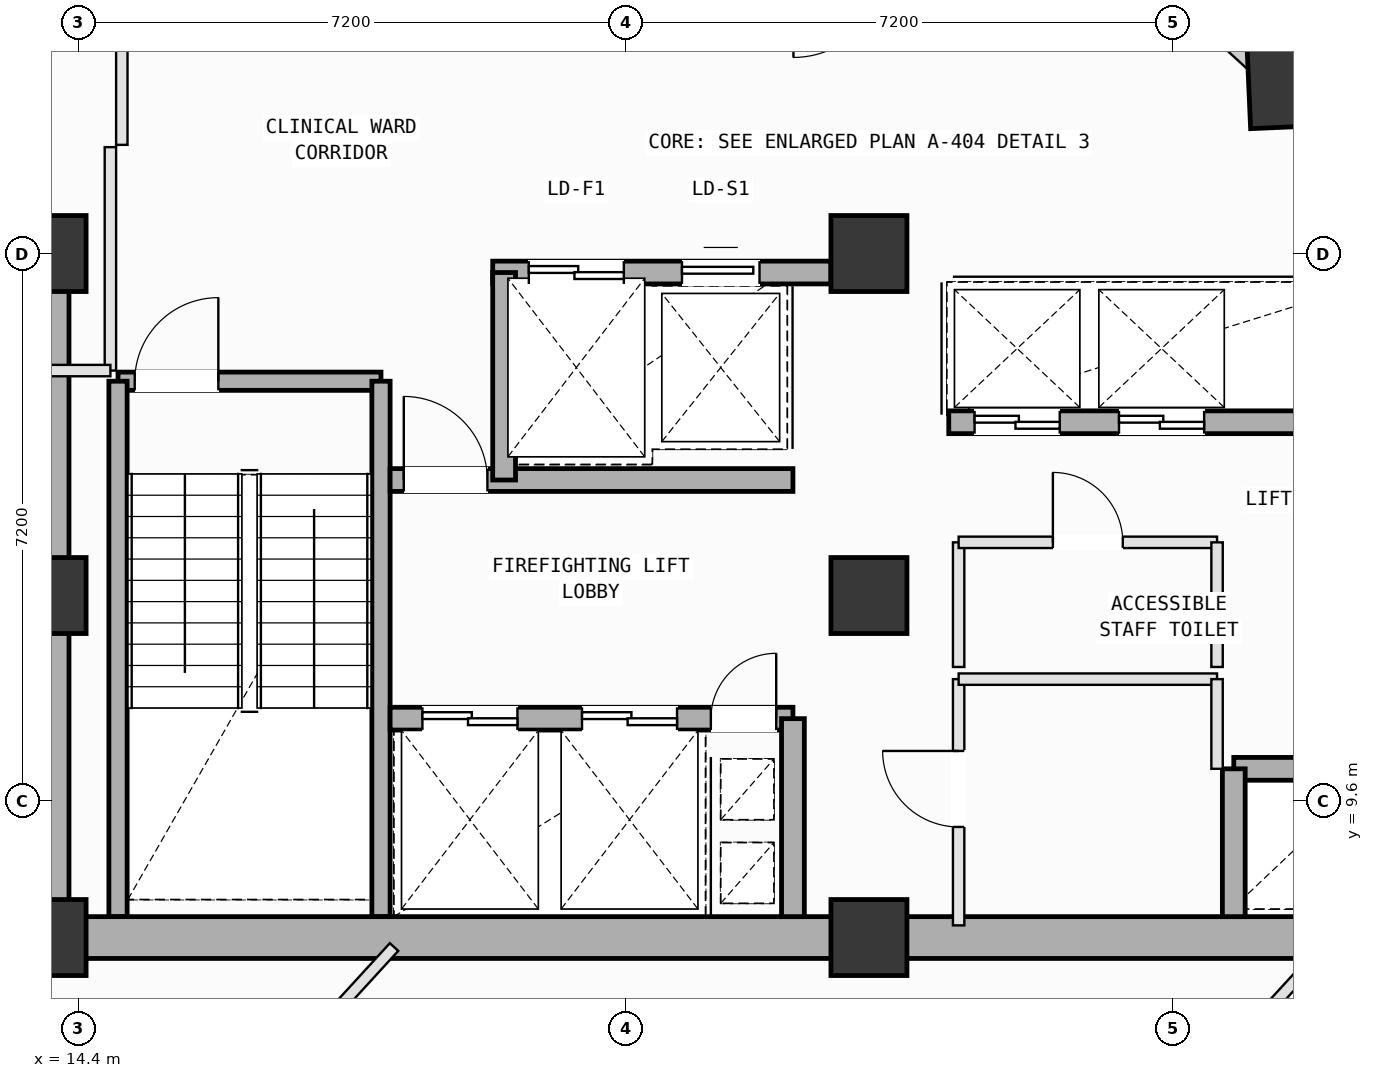
"""IFC4 building model, lengths in metres.
Left out: names, types, materials, properties, quantities, classifications, styles, units other than length and angle.
Written with IfcOpenShell. Run it as: python <this file> out.ifc"""

import sys

from ifc_helpers import new_model, si_unit, direction, frame, frame_2d, origin, origin_2d, place, context, subcontext, project, spatial, rectangle, extrude, element, fill, save


model = new_model("IFC4")
c1 = context("Model", 3, precision=1e-05, world=origin(), true_north=direction((0.0, 1.0)))
c2 = subcontext(c1, "Body", "Model", "MODEL_VIEW")
j1 = project(units=[si_unit("LENGTHUNIT", "METRE"), si_unit("PLANEANGLEUNIT", "RADIAN")], contexts=[c1])
p1 = place(None, origin())
s1 = spatial("IfcSite", under=j1, at=p1, CompositionType="ELEMENT")
p2 = place(p1, origin())
s2 = spatial("IfcBuilding", under=s1, at=p2, CompositionType="ELEMENT")
p3 = place(p2, frame((0.0, 0.0, 227.2)))
s3 = spatial("IfcBuildingStorey", under=s2, at=p3, CompositionType="ELEMENT", Elevation=227.2)
for number, where, z_axis, x_axis in (
    (1, (14.0, 7.8, 0.0), (0.0, 0.0, 1.0), (1.0, 0.0, 0.0)),
    (2, (14.0, 12.3, 0.0), (0.0, 0.0, 1.0), (1.0, 0.0, 0.0)),
    (3, (14.0, 16.8, 0.0), (0.0, 0.0, 1.0), (1.0, 0.0, 0.0)),
    (4, (24.8, 7.8, 0.0), (0.0, 0.0, 1.0), (1.0, 0.0, 0.0)),
    (5, (24.8, 12.3, 0.0), (0.0, 0.0, 1.0), (1.0, 0.0, 0.0)),
    (6, (24.8, 16.8, 0.0), (0.0, 0.0, 1.0), (1.0, 0.0, 0.0)),
):
    element("IfcColumn", number, at=place(p3, frame(where, z_axis=z_axis, x_axis=x_axis)), inside=s3, PredefinedType="COLUMN", context=c2, shape_type="SweptSolid", body=[
        extrude(rectangle(XDim=1.0, YDim=1.0, at=origin_2d()), origin(), (0.0, 0.0, 1.0), 4.0),
    ])
p4 = place(p3, frame((30.17, 19.059, 0.002), z_axis=(0.023938480459, -0.014045537004, 0.999614761818), x_axis=(-0.883420388309, 0.467760147115, 0.027728366183)))
e7 = element("IfcColumn", 7, at=p4, inside=s3, PredefinedType="COLUMN", context=c2, shape_type="SweptSolid", body=[
    extrude(rectangle(XDim=1.2, YDim=0.75, at=origin_2d()), origin(), (0.0, 0.0, 1.0), 3.998),
])
p5 = place(p3, frame((30.444, 19.358, 0.0), z_axis=(0.0, 0.0, 1.0), x_axis=(0.675589973943, 0.737277550931, 0.0)))
e8 = element("IfcWall", 8, at=p5, inside=s3, PredefinedType="SOLIDWALL", context=c2, shape_type="SweptSolid", body=[
    extrude(rectangle(XDim=6.158, YDim=0.28, at=frame_2d((3.079, 0.0))), origin(), (0.0, 0.0, 1.0), 3.265),
])
p6 = place(p5, frame((0.658, 0.0, 0.75)))
e9 = element("IfcOpeningElement", 9, at=p6, cuts=e8, PredefinedType="OPENING", context=c2, shape_type="SweptSolid", body=[
    extrude(rectangle(XDim=1.6, YDim=1.95, at=frame_2d((0.8, 0.975))), frame((0.0, 0.15, 0.0), z_axis=(0.0, -1.0, 0.0), x_axis=(1.0, 0.0, 0.0)), (0.0, 0.0, 1.0), 0.3),
])
p7 = place(p3, frame((24.787, 23.991, 0.0), z_axis=(0.0, 0.0, 1.0), x_axis=(0.737275011719, -0.675592744998, 0.0)))
e10 = element("IfcWall", 10, at=p7, inside=s3, PredefinedType="SOLIDWALL", context=c2, shape_type="SweptSolid", body=[
    extrude(rectangle(XDim=6.958, YDim=0.28, at=frame_2d((3.479, 0.0))), origin(), (0.0, 0.0, 1.0), 3.165),
])
p8 = place(p3, frame((14.92, 15.12, 0.0), z_axis=(0.0, 0.0, 1.0), x_axis=(1.0, 0.0, 0.0)))
e11 = element("IfcWall", 11, at=p8, inside=s3, PredefinedType="SOLIDWALL", context=c2, shape_type="SweptSolid", body=[
    extrude(rectangle(XDim=3.46, YDim=0.24, at=frame_2d((1.73, 0.0))), origin(), (0.0, 0.0, 1.0), 3.78),
])
p9 = place(p8, frame((0.22, 0.0, 0.0)))
e12 = element("IfcOpeningElement", 12, at=p9, cuts=e11, PredefinedType="OPENING", context=c2, shape_type="SweptSolid", body=[
    extrude(rectangle(XDim=1.1, YDim=2.15, at=frame_2d((0.55, 1.075))), frame((0.0, 0.13, 0.0), z_axis=(0.0, -1.0, 0.0), x_axis=(1.0, 0.0, 0.0)), (0.0, 0.0, 1.0), 0.26),
])
for number, where, z_axis, x_axis in (
    (13, (18.38, 15.12, 0.0), (0.0, 0.0, 1.0), (0.0, -1.0, 0.0)),
    (14, (14.92, 8.075, 0.0), (0.0, 0.0, 1.0), (0.0, 1.0, 0.0)),
):
    element("IfcWall", number, at=place(p3, frame(where, z_axis=z_axis, x_axis=x_axis)), inside=s3, PredefinedType="SOLIDWALL", context=c2, shape_type="SweptSolid", body=[
        extrude(rectangle(XDim=7.045, YDim=0.24, at=frame_2d((3.522, 0.0))), origin(), (0.0, 0.0, 1.0), 3.78),
    ])
for number, where, z_axis, x_axis in (
    (15, (14.0, 7.8, 0.0), (0.0, 0.0, 1.0), (1.0, 0.0, 0.0)),
    (16, (24.8, 7.8, 0.0), (0.0, 0.0, 1.0), (1.0, 0.0, 0.0)),
):
    element("IfcWall", number, at=place(p3, frame(where, z_axis=z_axis, x_axis=x_axis)), inside=s3, PredefinedType="SHEAR", context=c2, shape_type="SweptSolid", body=[
        extrude(rectangle(XDim=10.8, YDim=0.55, at=frame_2d((5.4, 0.0))), origin(), (0.0, 0.0, 1.0), 3.78),
    ])
p10 = place(p3, frame((14.0, 16.8, 0.0), z_axis=(0.0, 0.0, 1.0), x_axis=(0.0, -1.0, 0.0)))
e17 = element("IfcWall", 17, at=p10, inside=s3, PredefinedType="SHEAR", context=c2, shape_type="SweptSolid", body=[
    extrude(rectangle(XDim=9.0, YDim=0.55, at=frame_2d((4.5, 0.0))), origin(), (0.0, 0.0, 1.0), 3.78),
])
p11 = place(p3, frame((19.85, 16.55, 0.0), z_axis=(0.0, 0.0, 1.0), x_axis=(1.0, 0.0, 0.0)))
e18 = element("IfcWall", 18, at=p11, inside=s3, PredefinedType="SOLIDWALL", context=c2, shape_type="SweptSolid", body=[
    extrude(rectangle(XDim=4.45, YDim=0.3, at=frame_2d((2.225, 0.0))), origin(), (0.0, 0.0, 1.0), 3.78),
])
p12 = place(p11, frame((0.475, 0.0, 0.0)))
e19 = element("IfcOpeningElement", 19, at=p12, cuts=e18, PredefinedType="OPENING", context=c2, shape_type="SweptSolid", body=[
    extrude(rectangle(XDim=1.25, YDim=2.18, at=frame_2d((0.625, 1.09))), frame((0.0, 0.16, 0.0), z_axis=(0.0, -1.0, 0.0), x_axis=(1.0, 0.0, 0.0)), (0.0, 0.0, 1.0), 0.32),
])
p13 = place(p11, frame((2.49, 0.0, 0.0)))
e20 = element("IfcOpeningElement", 20, at=p13, cuts=e18, PredefinedType="OPENING", context=c2, shape_type="SweptSolid", body=[
    extrude(rectangle(XDim=1.02, YDim=2.12, at=frame_2d((0.51, 1.06))), frame((0.0, 0.16, 0.0), z_axis=(0.0, -1.0, 0.0), x_axis=(1.0, 0.0, 0.0)), (0.0, 0.0, 1.0), 0.32),
])
p14 = place(p3, frame((18.5, 10.68, 0.0), z_axis=(0.0, 0.0, 1.0), x_axis=(1.0, 0.0, 0.0)))
e21 = element("IfcWall", 21, at=p14, inside=s3, PredefinedType="SOLIDWALL", context=c2, shape_type="SweptSolid", body=[
    extrude(rectangle(XDim=5.3, YDim=0.3, at=frame_2d((2.65, 0.0))), origin(), (0.0, 0.0, 1.0), 3.78),
])
p15 = place(p14, frame((4.22, 0.0, 0.0)))
e22 = element("IfcOpeningElement", 22, at=p15, cuts=e21, PredefinedType="OPENING", context=c2, shape_type="SweptSolid", body=[
    extrude(rectangle(XDim=0.86, YDim=2.06, at=frame_2d((0.43, 1.03))), frame((0.0, 0.16, 0.0), z_axis=(0.0, -1.0, 0.0), x_axis=(1.0, 0.0, 0.0)), (0.0, 0.0, 1.0), 0.32),
])
p16 = place(p14, frame((0.425, 0.0, 0.0)))
e23 = element("IfcOpeningElement", 23, at=p16, cuts=e21, PredefinedType="OPENING", context=c2, shape_type="SweptSolid", body=[
    extrude(rectangle(XDim=1.25, YDim=2.18, at=frame_2d((0.625, 1.09))), frame((0.0, 0.16, 0.0), z_axis=(0.0, -1.0, 0.0), x_axis=(1.0, 0.0, 0.0)), (0.0, 0.0, 1.0), 0.32),
])
p17 = place(p14, frame((2.525, 0.0, 0.0)))
e24 = element("IfcOpeningElement", 24, at=p17, cuts=e21, PredefinedType="OPENING", context=c2, shape_type="SweptSolid", body=[
    extrude(rectangle(XDim=1.25, YDim=2.18, at=frame_2d((0.625, 1.09))), frame((0.0, 0.16, 0.0), z_axis=(0.0, -1.0, 0.0), x_axis=(1.0, 0.0, 0.0)), (0.0, 0.0, 1.0), 0.32),
])
p18 = place(p3, frame((18.5, 13.82, 0.0), z_axis=(0.0, 0.0, 1.0), x_axis=(1.0, 0.0, 0.0)))
e25 = element("IfcWall", 25, at=p18, inside=s3, PredefinedType="SOLIDWALL", context=c2, shape_type="SweptSolid", body=[
    extrude(rectangle(XDim=5.3, YDim=0.3, at=frame_2d((2.65, 0.0))), origin(), (0.0, 0.0, 1.0), 3.78),
])
p19 = place(p18, frame((0.18, 0.0, 0.0)))
e26 = element("IfcOpeningElement", 26, at=p19, cuts=e25, PredefinedType="OPENING", context=c2, shape_type="SweptSolid", body=[
    extrude(rectangle(XDim=1.1, YDim=2.15, at=frame_2d((0.55, 1.075))), frame((0.0, 0.16, 0.0), z_axis=(0.0, -1.0, 0.0), x_axis=(1.0, 0.0, 0.0)), (0.0, 0.0, 1.0), 0.32),
])
p20 = place(p3, frame((23.8, 8.075, 0.0), z_axis=(0.0, 0.0, 1.0), x_axis=(0.0, 1.0, 0.0)))
e27 = element("IfcWall", 27, at=p20, inside=s3, PredefinedType="SOLIDWALL", context=c2, shape_type="SweptSolid", body=[
    extrude(rectangle(XDim=2.605, YDim=0.3, at=frame_2d((1.302, 0.0))), origin(), (0.0, 0.0, 1.0), 3.78),
])
p21 = place(p3, frame((20.0, 13.82, 0.0), z_axis=(0.0, 0.0, 1.0), x_axis=(0.0, 1.0, 0.0)))
e28 = element("IfcWall", 28, at=p21, inside=s3, PredefinedType="SOLIDWALL", context=c2, shape_type="SweptSolid", body=[
    extrude(rectangle(XDim=2.73, YDim=0.3, at=frame_2d((1.365, 0.0))), origin(), (0.0, 0.0, 1.0), 3.78),
])
p22 = place(p3, frame((29.6, 10.02, 0.0), z_axis=(0.0, 0.0, 1.0), x_axis=(1.0, 0.0, 0.0)))
e29 = element("IfcWall", 29, at=p22, inside=s3, PredefinedType="SOLIDWALL", context=c2, shape_type="SweptSolid", body=[
    extrude(rectangle(XDim=1.7, YDim=0.3, at=frame_2d((0.85, 0.0))), origin(), (0.0, 0.0, 1.0), 3.78),
])
p23 = place(p3, frame((29.6, 8.075, 0.0), z_axis=(0.0, 0.0, 1.0), x_axis=(0.0, 1.0, 0.0)))
e30 = element("IfcWall", 30, at=p23, inside=s3, PredefinedType="SOLIDWALL", context=c2, shape_type="SweptSolid", body=[
    extrude(rectangle(XDim=1.945, YDim=0.3, at=frame_2d((0.973, 0.0))), origin(), (0.0, 0.0, 1.0), 3.78),
])
p24 = place(p3, frame((25.85, 14.58, 0.0), z_axis=(0.0, 0.0, 1.0), x_axis=(1.0, 0.0, 0.0)))
e31 = element("IfcWall", 31, at=p24, inside=s3, PredefinedType="SOLIDWALL", context=c2, shape_type="SweptSolid", body=[
    extrude(rectangle(XDim=5.45, YDim=0.3, at=frame_2d((2.725, 0.0))), origin(), (0.0, 0.0, 1.0), 3.78),
])
p25 = place(p24, frame((0.34, 0.0, 0.0)))
e32 = element("IfcOpeningElement", 32, at=p25, cuts=e31, PredefinedType="OPENING", context=c2, shape_type="SweptSolid", body=[
    extrude(rectangle(XDim=1.12, YDim=2.15, at=frame_2d((0.56, 1.075))), frame((0.0, 0.16, 0.0), z_axis=(0.0, -1.0, 0.0), x_axis=(1.0, 0.0, 0.0)), (0.0, 0.0, 1.0), 0.32),
])
p26 = place(p24, frame((2.24, 0.0, 0.0)))
e33 = element("IfcOpeningElement", 33, at=p26, cuts=e31, PredefinedType="OPENING", context=c2, shape_type="SweptSolid", body=[
    extrude(rectangle(XDim=1.12, YDim=2.15, at=frame_2d((0.56, 1.075))), frame((0.0, 0.16, 0.0), z_axis=(0.0, -1.0, 0.0), x_axis=(1.0, 0.0, 0.0)), (0.0, 0.0, 1.0), 0.32),
])
p27 = place(p3, frame((25.98, 7.96, 0.0), z_axis=(0.0, 0.0, 1.0), x_axis=(0.0, 1.0, 0.0)))
e34 = element("IfcWall", 34, at=p27, inside=s3, PredefinedType="PARTITIONING", context=c2, shape_type="SweptSolid", body=[
    extrude(rectangle(XDim=3.24, YDim=0.15, at=frame_2d((1.62, 0.0))), origin(), (0.0, 0.0, 1.0), 3.78),
])
p28 = place(p27, frame((1.295, 0.0, 0.0)))
e35 = element("IfcOpeningElement", 35, at=p28, cuts=e34, PredefinedType="OPENING", context=c2, shape_type="SweptSolid", body=[
    extrude(rectangle(XDim=1.0, YDim=2.12, at=frame_2d((0.5, 1.06))), frame((0.0, 0.085, 0.0), z_axis=(0.0, -1.0, 0.0), x_axis=(1.0, 0.0, 0.0)), (0.0, 0.0, 1.0), 0.17),
])
p29 = place(p3, frame((25.98, 11.2, 0.0), z_axis=(0.0, 0.0, 1.0), x_axis=(1.0, 0.0, 0.0)))
e36 = element("IfcWall", 36, at=p29, inside=s3, PredefinedType="PARTITIONING", context=c2, shape_type="SweptSolid", body=[
    extrude(rectangle(XDim=3.4, YDim=0.15, at=frame_2d((1.7, 0.0))), origin(), (0.0, 0.0, 1.0), 3.78),
])
p30 = place(p3, frame((29.38, 11.2, 0.0), z_axis=(0.0, 0.0, 1.0), x_axis=(0.0, -1.0, 0.0)))
e37 = element("IfcWall", 37, at=p30, inside=s3, PredefinedType="PARTITIONING", context=c2, shape_type="SweptSolid", body=[
    extrude(rectangle(XDim=1.18, YDim=0.15, at=frame_2d((0.59, 0.0))), origin(), (0.0, 0.0, 1.0), 3.78),
])
p31 = place(p3, frame((25.98, 11.36, 0.0), z_axis=(0.0, 0.0, 1.0), x_axis=(0.0, 1.0, 0.0)))
e38 = element("IfcWall", 38, at=p31, inside=s3, PredefinedType="PARTITIONING", context=c2, shape_type="SweptSolid", body=[
    extrude(rectangle(XDim=1.64, YDim=0.15, at=frame_2d((0.82, 0.0))), origin(), (0.0, 0.0, 1.0), 3.78),
])
p32 = place(p3, frame((25.98, 13.0, 0.0), z_axis=(0.0, 0.0, 1.0), x_axis=(1.0, 0.0, 0.0)))
e39 = element("IfcWall", 39, at=p32, inside=s3, PredefinedType="PARTITIONING", context=c2, shape_type="SweptSolid", body=[
    extrude(rectangle(XDim=3.4, YDim=0.15, at=frame_2d((1.7, 0.0))), origin(), (0.0, 0.0, 1.0), 3.78),
])
p33 = place(p32, frame((1.24, 0.0, 0.0)))
e40 = element("IfcOpeningElement", 40, at=p33, cuts=e39, PredefinedType="OPENING", context=c2, shape_type="SweptSolid", body=[
    extrude(rectangle(XDim=0.92, YDim=2.1, at=frame_2d((0.46, 1.05))), frame((0.0, 0.085, 0.0), z_axis=(0.0, -1.0, 0.0), x_axis=(1.0, 0.0, 0.0)), (0.0, 0.0, 1.0), 0.17),
])
p34 = place(p3, frame((29.38, 13.0, 0.0), z_axis=(0.0, 0.0, 1.0), x_axis=(0.0, -1.0, 0.0)))
e41 = element("IfcWall", 41, at=p34, inside=s3, PredefinedType="PARTITIONING", context=c2, shape_type="SweptSolid", body=[
    extrude(rectangle(XDim=1.64, YDim=0.15, at=frame_2d((0.82, 0.0))), origin(), (0.0, 0.0, 1.0), 3.78),
])
p35 = place(p3, frame((28.149, 3.753, 0.0), z_axis=(0.0, 0.0, 1.0), x_axis=(0.675493888576, 0.737365585376, 0.0)))
e42 = element("IfcWall", 42, at=p35, inside=s3, PredefinedType="PARTITIONING", context=c2, shape_type="SweptSolid", body=[
    extrude(rectangle(XDim=5.319, YDim=0.15, at=frame_2d((2.66, 0.0))), origin(), (0.0, 0.0, 1.0), 3.78),
])
p36 = place(p3, frame((15.483, 4.325, 0.0), z_axis=(0.0, 0.0, 1.0), x_axis=(0.675505602281, 0.737354854387, 0.0)))
e43 = element("IfcWall", 43, at=p36, inside=s3, PredefinedType="PARTITIONING", context=c2, shape_type="SweptSolid", body=[
    extrude(rectangle(XDim=4.543, YDim=0.15, at=frame_2d((2.272, 0.0))), origin(), (0.0, 0.0, 1.0), 3.78),
])
p37 = place(p36, frame((1.723, 0.0, 0.0)))
e44 = element("IfcOpeningElement", 44, at=p37, cuts=e43, PredefinedType="OPENING", context=c2, shape_type="SweptSolid", body=[
    extrude(rectangle(XDim=0.86, YDim=2.06, at=frame_2d((0.43, 1.03))), frame((0.0, 0.085, 0.0), z_axis=(0.0, -1.0, 0.0), x_axis=(1.0, 0.0, 0.0)), (0.0, 0.0, 1.0), 0.17),
])
p38 = place(p3, frame((30.813, 7.675, 0.0), z_axis=(0.0, 0.0, 1.0), x_axis=(-0.675559122353, -0.73730582, 0.0)))
e45 = element("IfcWall", 45, at=p38, inside=s3, PredefinedType="PARTITIONING", context=c2, shape_type="SweptSolid", body=[
    extrude(rectangle(XDim=12.826, YDim=0.15, at=frame_2d((6.413, 0.0))), origin(), (0.0, 0.0, 1.0), 3.78),
])
p39 = place(p3, frame((14.97, 20.55, 0.0), z_axis=(0.0, 0.0, 1.0), x_axis=(0.0, -1.0, 0.0)))
e46 = element("IfcWall", 46, at=p39, inside=s3, PredefinedType="PARTITIONING", context=c2, shape_type="SweptSolid", body=[
    extrude(rectangle(XDim=2.32, YDim=0.15, at=frame_2d((1.16, 0.0))), origin(), (0.0, 0.0, 1.0), 3.78),
])
p40 = place(p3, frame((14.82, 18.2, 0.0), z_axis=(0.0, 0.0, 1.0), x_axis=(0.0, -1.0, 0.0)))
e47 = element("IfcWall", 47, at=p40, inside=s3, PredefinedType="PARTITIONING", context=c2, shape_type="SweptSolid", body=[
    extrude(rectangle(XDim=2.94, YDim=0.15, at=frame_2d((1.47, 0.0))), origin(), (0.0, 0.0, 1.0), 3.78),
])
p41 = place(p3, frame((14.82, 15.26, 0.0), z_axis=(0.0, 0.0, 1.0), x_axis=(-1.0, 0.0, 0.0)))
e48 = element("IfcWall", 48, at=p41, inside=s3, PredefinedType="PARTITIONING", context=c2, shape_type="SweptSolid", body=[
    extrude(rectangle(XDim=1.12, YDim=0.15, at=frame_2d((0.56, 0.0))), origin(), (0.0, 0.0, 1.0), 3.78),
])
p42 = place(p9, origin())
e49 = element("IfcDoor", 49, at=p42, inside=s3, OperationType="SINGLE_SWING_RIGHT", PredefinedType="DOOR", context=c2, shape_type="SweptSolid", body=[
    extrude(rectangle(XDim=1.1, YDim=2.15, at=frame_2d((0.55, 1.075))), frame((0.0, 0.025, 0.0), z_axis=(0.0, -1.0, 0.0), x_axis=(1.0, 0.0, 0.0)), (0.0, 0.0, 1.0), 0.05),
])
fill(e12, e49)
p43 = place(p15, origin())
e50 = element("IfcDoor", 50, at=p43, inside=s3, OperationType="SINGLE_SWING_RIGHT", PredefinedType="DOOR", context=c2, shape_type="SweptSolid", body=[
    extrude(rectangle(XDim=0.86, YDim=2.06, at=frame_2d((0.43, 1.03))), frame((0.0, 0.025, 0.0), z_axis=(0.0, -1.0, 0.0), x_axis=(1.0, 0.0, 0.0)), (0.0, 0.0, 1.0), 0.05),
])
fill(e22, e50)
p44 = place(p19, origin())
e51 = element("IfcDoor", 51, at=p44, inside=s3, OperationType="SINGLE_SWING_LEFT", PredefinedType="DOOR", context=c2, shape_type="SweptSolid", body=[
    extrude(rectangle(XDim=1.1, YDim=2.15, at=frame_2d((0.55, 1.075))), frame((0.0, 0.025, 0.0), z_axis=(0.0, -1.0, 0.0), x_axis=(1.0, 0.0, 0.0)), (0.0, 0.0, 1.0), 0.05),
])
fill(e26, e51)
p45 = place(p16, origin())
e52 = element("IfcDoor", 52, at=p45, inside=s3, OperationType="DOUBLE_DOOR_SLIDING", PredefinedType="DOOR", context=c2, shape_type="SweptSolid", body=[
    extrude(rectangle(XDim=1.25, YDim=2.18, at=frame_2d((0.625, 1.09))), frame((0.0, 0.025, 0.0), z_axis=(0.0, -1.0, 0.0), x_axis=(1.0, 0.0, 0.0)), (0.0, 0.0, 1.0), 0.05),
])
fill(e23, e52)
p46 = place(p17, origin())
e53 = element("IfcDoor", 53, at=p46, inside=s3, OperationType="DOUBLE_DOOR_SLIDING", PredefinedType="DOOR", context=c2, shape_type="SweptSolid", body=[
    extrude(rectangle(XDim=1.25, YDim=2.18, at=frame_2d((0.625, 1.09))), frame((0.0, 0.025, 0.0), z_axis=(0.0, -1.0, 0.0), x_axis=(1.0, 0.0, 0.0)), (0.0, 0.0, 1.0), 0.05),
])
fill(e24, e53)
p47 = place(p25, origin())
e54 = element("IfcDoor", 54, at=p47, inside=s3, OperationType="DOUBLE_DOOR_SLIDING", PredefinedType="DOOR", context=c2, shape_type="SweptSolid", body=[
    extrude(rectangle(XDim=1.12, YDim=2.15, at=frame_2d((0.56, 1.075))), frame((0.0, 0.025, 0.0), z_axis=(0.0, -1.0, 0.0), x_axis=(1.0, 0.0, 0.0)), (0.0, 0.0, 1.0), 0.05),
])
fill(e32, e54)
p48 = place(p26, origin())
e55 = element("IfcDoor", 55, at=p48, inside=s3, OperationType="DOUBLE_DOOR_SLIDING", PredefinedType="DOOR", context=c2, shape_type="SweptSolid", body=[
    extrude(rectangle(XDim=1.12, YDim=2.15, at=frame_2d((0.56, 1.075))), frame((0.0, 0.025, 0.0), z_axis=(0.0, -1.0, 0.0), x_axis=(1.0, 0.0, 0.0)), (0.0, 0.0, 1.0), 0.05),
])
fill(e33, e55)
p49 = place(p12, origin())
e56 = element("IfcDoor", 56, at=p49, inside=s3, OperationType="DOUBLE_DOOR_SLIDING", PredefinedType="DOOR", context=c2, shape_type="SweptSolid", body=[
    extrude(rectangle(XDim=1.25, YDim=2.18, at=frame_2d((0.625, 1.09))), frame((0.0, 0.025, 0.0), z_axis=(0.0, -1.0, 0.0), x_axis=(1.0, 0.0, 0.0)), (0.0, 0.0, 1.0), 0.05),
])
fill(e19, e56)
p50 = place(p13, origin())
e57 = element("IfcDoor", 57, at=p50, inside=s3, OperationType="SLIDING_TO_LEFT", PredefinedType="DOOR", context=c2, shape_type="SweptSolid", body=[
    extrude(rectangle(XDim=1.02, YDim=2.12, at=frame_2d((0.51, 1.06))), frame((0.0, 0.025, 0.0), z_axis=(0.0, -1.0, 0.0), x_axis=(1.0, 0.0, 0.0)), (0.0, 0.0, 1.0), 0.05),
])
fill(e20, e57)
p51 = place(p28, origin())
e58 = element("IfcDoor", 58, at=p51, inside=s3, OperationType="SINGLE_SWING_RIGHT", PredefinedType="DOOR", context=c2, shape_type="SweptSolid", body=[
    extrude(rectangle(XDim=1.0, YDim=2.12, at=frame_2d((0.5, 1.06))), frame((0.0, 0.025, 0.0), z_axis=(0.0, -1.0, 0.0), x_axis=(1.0, 0.0, 0.0)), (0.0, 0.0, 1.0), 0.05),
])
fill(e35, e58)
p52 = place(p33, origin())
e59 = element("IfcDoor", 59, at=p52, inside=s3, OperationType="SINGLE_SWING_LEFT", PredefinedType="DOOR", context=c2, shape_type="SweptSolid", body=[
    extrude(rectangle(XDim=0.92, YDim=2.1, at=frame_2d((0.46, 1.05))), frame((0.0, 0.025, 0.0), z_axis=(0.0, -1.0, 0.0), x_axis=(1.0, 0.0, 0.0)), (0.0, 0.0, 1.0), 0.05),
])
fill(e40, e59)
save(model, sys.argv[1])
